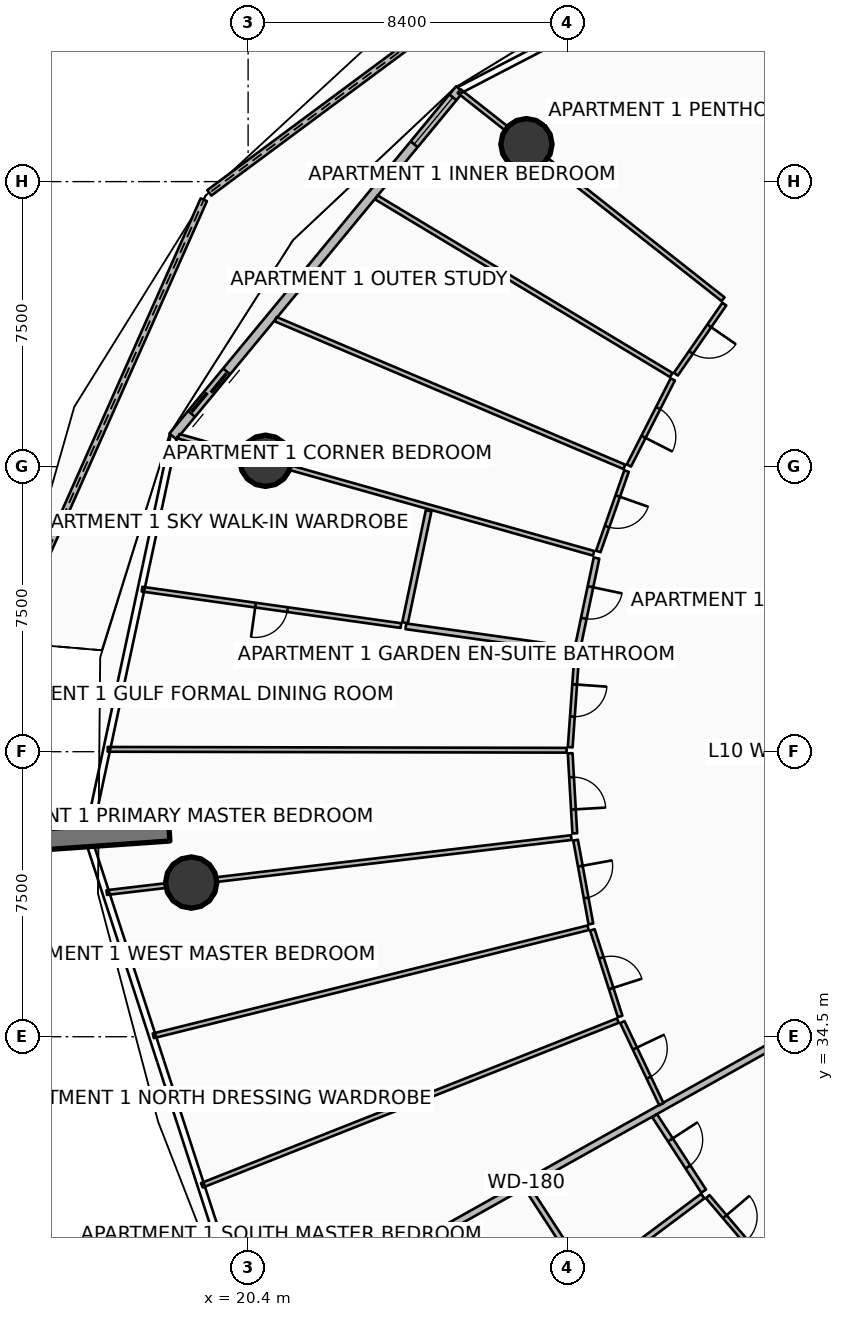
"""IFC4 building model, lengths in metres.
Left out: names, types, materials, properties, quantities, classifications, styles, units other than length and angle.
Written with IfcOpenShell. Run it as: python <this file> out.ifc"""

import sys

from ifc_helpers import new_model, si_unit, direction, frame, frame_2d, origin, origin_2d, place, context, subcontext, project, spatial, polyline, rectangle, circle, outline, extrude, element, fill, save


model = new_model("IFC4")
c1 = context("Model", 3, precision=1e-05, world=origin(), true_north=direction((0.0, 1.0)))
c2 = subcontext(c1, "Body", "Model", "MODEL_VIEW")
j1 = project(units=[si_unit("LENGTHUNIT", "METRE"), si_unit("PLANEANGLEUNIT", "RADIAN")], contexts=[c1])
p1 = place(None, origin())
s1 = spatial("IfcSite", under=j1, at=p1, CompositionType="ELEMENT")
p2 = place(p1, origin())
s2 = spatial("IfcBuilding", under=s1, at=p2, CompositionType="ELEMENT")
p3 = place(p2, frame((0.0, 0.0, 45.15)))
s3 = spatial("IfcBuildingStorey", under=s2, at=p3, CompositionType="ELEMENT", Elevation=45.15)
p4 = place(p3, frame((18.322, 39.925, 0.0), z_axis=(0.0, 0.0, 1.0), x_axis=(-0.997564163539, -0.069754853754, 0.0)))
e1 = element("IfcWall", 1, at=p4, inside=s3, PredefinedType="SOLIDWALL", context=c2, shape_type="SweptSolid", body=[
    extrude(rectangle(XDim=3.5, YDim=0.55, at=frame_2d((1.75, 0.0))), origin(), (0.0, 0.0, 1.0), 3.75),
])
for number, where, z_axis, x_axis in (
    (2, (27.724, 57.984, 0.0), (0.0, 0.0, 1.0), (1.0, 0.0, 0.0)),
    (3, (20.859, 49.655, 0.0), (0.0, 0.0, 1.0), (1.0, 0.0, 0.0)),
    (4, (18.902, 38.556, 0.0), (0.0, 0.0, 1.0), (1.0, 0.0, 0.0)),
):
    element("IfcColumn", number, at=place(p3, frame(where, z_axis=z_axis, x_axis=x_axis)), inside=s3, PredefinedType="COLUMN", context=c2, shape_type="SweptSolid", body=[
        extrude(circle(Radius=0.675, at=origin_2d()), origin(), (0.0, 0.0, 1.0), 3.5),
    ])
p5 = place(p3, frame((29.067, 63.896, 0.0), z_axis=(0.0, 0.0, 1.0), x_axis=(-0.802947764501, -0.596049400204, 0.0)))
e5 = element("IfcWall", 5, at=p5, inside=s3, PredefinedType="PARAPET", context=c2, shape_type="SweptSolid", body=[
    extrude(outline(polyline([(0.0, 0.0), (12.065, 0.0), (12.066, 1.832), (6.033, 1.696), (0.0, 1.497), (0.0, 0.0)])), frame((0.0, 0.09, 0.0), z_axis=(0.0, -1.0, 0.0), x_axis=(1.0, 0.0, 0.0)), (0.0, 0.0, 1.0), 0.18),
])
p6 = place(p3, frame((19.234, 56.523, 0.0), z_axis=(0.0, 0.0, 1.0), x_axis=(-0.405953542593, -0.91389371442, 0.0)))
e6 = element("IfcWall", 6, at=p6, inside=s3, PredefinedType="PARAPET", context=c2, shape_type="SweptSolid", body=[
    extrude(outline(polyline([(0.0, 0.0), (12.74, 0.0), (12.74, 1.756), (6.37, 1.853), (0.0, 1.832), (0.0, 0.0)])), frame((0.0, 0.09, 0.0), z_axis=(0.0, -1.0, 0.0), x_axis=(1.0, 0.0, 0.0)), (0.0, 0.0, 1.0), 0.18),
])
p7 = place(p3, frame((25.967, 59.433, 0.0), z_axis=(0.0, 0.0, 1.0), x_axis=(-0.636674332663, -0.771132799281, 0.0)))
e7 = element("IfcWall", 7, at=p7, inside=s3, PredefinedType="SOLIDWALL", context=c2, shape_type="SweptSolid", body=[
    extrude(rectangle(XDim=11.851, YDim=0.24, at=frame_2d((5.926, 0.0))), origin(), (0.0, 0.0, 1.0), 2.45),
])
p8 = place(p7, frame((9.631, 0.0, 0.0)))
e8 = element("IfcOpeningElement", 8, at=p8, cuts=e7, PredefinedType="OPENING", context=c2, shape_type="SweptSolid", body=[
    extrude(rectangle(XDim=1.45, YDim=2.15, at=frame_2d((0.725, 1.075))), frame((0.0, 0.13, 0.0), z_axis=(0.0, -1.0, 0.0), x_axis=(1.0, 0.0, 0.0)), (0.0, 0.0, 1.0), 0.26),
])
p9 = place(p7, frame((0.28, 0.0, 0.65)))
e9 = element("IfcOpeningElement", 9, at=p9, cuts=e7, PredefinedType="OPENING", context=c2, shape_type="SweptSolid", body=[
    extrude(rectangle(XDim=1.6, YDim=1.5, at=frame_2d((0.8, 0.75))), frame((0.0, 0.13, 0.0), z_axis=(0.0, -1.0, 0.0), x_axis=(1.0, 0.0, 0.0)), (0.0, 0.0, 1.0), 0.26),
])
p10 = place(p3, frame((34.954, 34.694, 0.0), z_axis=(0.0, 0.0, 1.0), x_axis=(-0.872493465611, -0.488625779577, 0.0)))
e10 = element("IfcWall", 10, at=p10, inside=s3, PredefinedType="PARTITIONING", context=c2, shape_type="SweptSolid", body=[
    extrude(rectangle(XDim=16.586, YDim=0.18, at=frame_2d((8.293, 0.0))), origin(), (0.0, 0.0, 1.0), 2.867),
])
p11 = place(p3, frame((32.898, 53.905, 0.0), z_axis=(0.0, 0.0, 1.0), x_axis=(-0.78532854108, 0.619079221558, 0.0)))
e11 = element("IfcWall", 11, at=p11, inside=s3, PredefinedType="PARTITIONING", context=c2, shape_type="SweptSolid", body=[
    extrude(rectangle(XDim=8.842, YDim=0.125, at=frame_2d((4.421, 0.0))), origin(), (0.0, 0.0, 1.0), 2.867),
])
p12 = place(p3, frame((31.534, 51.913, 0.0), z_axis=(0.0, 0.0, 1.0), x_axis=(-0.856706990958, 0.515803384676, 0.0)))
e12 = element("IfcWall", 12, at=p12, inside=s3, PredefinedType="PARTITIONING", context=c2, shape_type="SweptSolid", body=[
    extrude(rectangle(XDim=9.057, YDim=0.125, at=frame_2d((4.528, 0.0))), origin(), (0.0, 0.0, 1.0), 2.94),
])
p13 = place(p3, frame((30.301, 49.494, 0.0), z_axis=(0.0, 0.0, 1.0), x_axis=(-0.920840746031, 0.389938867579, 0.0)))
e13 = element("IfcWall", 13, at=p13, inside=s3, PredefinedType="PARTITIONING", context=c2, shape_type="SweptSolid", body=[
    extrude(rectangle(XDim=9.966, YDim=0.125, at=frame_2d((4.983, 0.0))), origin(), (0.0, 0.0, 1.0), 2.94),
])
p14 = place(p3, frame((32.931, 53.778, 0.0), z_axis=(0.0, 0.0, 1.0), x_axis=(-0.568541738061, -0.822654418382, 0.0)))
e14 = element("IfcWall", 14, at=p14, inside=s3, PredefinedType="PARTITIONING", context=c2, shape_type="SweptSolid", body=[
    extrude(rectangle(XDim=2.242, YDim=0.125, at=frame_2d((1.121, 0.0))), origin(), (0.0, 0.0, 1.0), 2.867),
])
p15 = place(p14, frame((0.696, 0.0, 0.0)))
e15 = element("IfcOpeningElement", 15, at=p15, cuts=e14, PredefinedType="OPENING", context=c2, shape_type="SweptSolid", body=[
    extrude(rectangle(XDim=0.85, YDim=2.06, at=frame_2d((0.425, 1.03))), frame((0.0, 0.073, 0.0), z_axis=(0.0, -1.0, 0.0), x_axis=(1.0, 0.0, 0.0)), (0.0, 0.0, 1.0), 0.145),
])
p16 = place(p3, frame((31.575, 51.796, 0.0), z_axis=(0.0, 0.0, 1.0), x_axis=(-0.454037986735, -0.890982326762, 0.0)))
e16 = element("IfcWall", 16, at=p16, inside=s3, PredefinedType="PARTITIONING", context=c2, shape_type="SweptSolid", body=[
    extrude(rectangle(XDim=2.542, YDim=0.125, at=frame_2d((1.271, 0.0))), origin(), (0.0, 0.0, 1.0), 2.94),
])
p17 = place(p16, frame((0.846, 0.0, 0.0)))
e17 = element("IfcOpeningElement", 17, at=p17, cuts=e16, PredefinedType="OPENING", context=c2, shape_type="SweptSolid", body=[
    extrude(rectangle(XDim=0.85, YDim=2.06, at=frame_2d((0.425, 1.03))), frame((0.0, 0.073, 0.0), z_axis=(0.0, -1.0, 0.0), x_axis=(1.0, 0.0, 0.0)), (0.0, 0.0, 1.0), 0.145),
])
p18 = place(p3, frame((30.358, 49.384, 0.0), z_axis=(0.0, 0.0, 1.0), x_axis=(-0.331344536708, -0.943509829304, 0.0)))
e18 = element("IfcWall", 18, at=p18, inside=s3, PredefinedType="PARTITIONING", context=c2, shape_type="SweptSolid", body=[
    extrude(rectangle(XDim=2.242, YDim=0.125, at=frame_2d((1.121, 0.0))), origin(), (0.0, 0.0, 1.0), 2.867),
])
p19 = place(p18, frame((0.696, 0.0, 0.0)))
e19 = element("IfcOpeningElement", 19, at=p19, cuts=e18, PredefinedType="OPENING", context=c2, shape_type="SweptSolid", body=[
    extrude(rectangle(XDim=0.85, YDim=2.06, at=frame_2d((0.425, 1.03))), frame((0.0, 0.073, 0.0), z_axis=(0.0, -1.0, 0.0), x_axis=(1.0, 0.0, 0.0)), (0.0, 0.0, 1.0), 0.145),
])
p20 = place(p3, frame((29.492, 47.22, 0.0), z_axis=(0.0, 0.0, 1.0), x_axis=(-0.962454721813, 0.271442274635, 0.0)))
e20 = element("IfcWall", 20, at=p20, inside=s3, PredefinedType="PARTITIONING", context=c2, shape_type="SweptSolid", body=[
    extrude(rectangle(XDim=11.344, YDim=0.125, at=frame_2d((5.672, 0.0))), origin(), (0.0, 0.0, 1.0), 2.867),
])
p21 = place(p3, frame((29.568, 47.095, 0.0), z_axis=(0.0, 0.0, 1.0), x_axis=(-0.205861309483, -0.978581177654, 0.0)))
e21 = element("IfcWall", 21, at=p21, inside=s3, PredefinedType="PARTITIONING", context=c2, shape_type="SweptSolid", body=[
    extrude(rectangle(XDim=2.392, YDim=0.15, at=frame_2d((1.196, 0.0))), origin(), (0.0, 0.0, 1.0), 2.867),
])
p22 = place(p21, frame((0.771, 0.0, 0.0)))
e22 = element("IfcOpeningElement", 22, at=p22, cuts=e21, PredefinedType="OPENING", context=c2, shape_type="SweptSolid", body=[
    extrude(rectangle(XDim=0.85, YDim=2.06, at=frame_2d((0.425, 1.03))), frame((0.0, 0.085, 0.0), z_axis=(0.0, -1.0, 0.0), x_axis=(1.0, 0.0, 0.0)), (0.0, 0.0, 1.0), 0.17),
])
p23 = place(p3, frame((25.15, 48.341, 0.0), z_axis=(0.0, 0.0, 1.0), x_axis=(-0.205879759174, -0.978577296264, 0.0)))
e23 = element("IfcWall", 23, at=p23, inside=s3, PredefinedType="PARTITIONING", context=c2, shape_type="SweptSolid", body=[
    extrude(rectangle(XDim=3.012, YDim=0.15, at=frame_2d((1.506, 0.0))), origin(), (0.0, 0.0, 1.0), 2.867),
])
p24 = place(p3, frame((28.968, 44.678, 0.0), z_axis=(0.0, 0.0, 1.0), x_axis=(-0.990240767804, 0.139367219172, 0.0)))
e24 = element("IfcWall", 24, at=p24, inside=s3, PredefinedType="PARTITIONING", context=c2, shape_type="SweptSolid", body=[
    extrude(rectangle(XDim=4.46, YDim=0.15, at=frame_2d((2.23, 0.0))), origin(), (0.0, 0.0, 1.0), 2.94),
])
p25 = place(p3, frame((24.422, 45.318, 0.0), z_axis=(0.0, 0.0, 1.0), x_axis=(-0.990243959665, 0.139344538274, 0.0)))
e25 = element("IfcWall", 25, at=p25, inside=s3, PredefinedType="PARTITIONING", context=c2, shape_type="SweptSolid", body=[
    extrude(rectangle(XDim=6.88, YDim=0.125, at=frame_2d((3.44, 0.0))), origin(), (0.0, 0.0, 1.0), 2.94),
])
p26 = place(p25, frame((3.015, 0.0, 0.0)))
e26 = element("IfcOpeningElement", 26, at=p26, cuts=e25, PredefinedType="OPENING", context=c2, shape_type="SweptSolid", body=[
    extrude(rectangle(XDim=0.85, YDim=2.06, at=frame_2d((0.425, 1.03))), frame((0.0, 0.073, 0.0), z_axis=(0.0, -1.0, 0.0), x_axis=(1.0, 0.0, 0.0)), (0.0, 0.0, 1.0), 0.145),
])
p27 = place(p3, frame((28.78, 42.038, 0.0), z_axis=(0.0, 0.0, 1.0), x_axis=(-0.999998036955, 0.001981435282, 0.0)))
e27 = element("IfcWall", 27, at=p27, inside=s3, PredefinedType="PARTITIONING", context=c2, shape_type="SweptSolid", body=[
    extrude(rectangle(XDim=12.075, YDim=0.125, at=frame_2d((6.038, 0.0))), origin(), (0.0, 0.0, 1.0), 2.94),
])
p28 = place(p3, frame((29.05, 44.576, 0.0), z_axis=(0.0, 0.0, 1.0), x_axis=(-0.070831673661, -0.997488282641, 0.0)))
e28 = element("IfcWall", 28, at=p28, inside=s3, PredefinedType="PARTITIONING", context=c2, shape_type="SweptSolid", body=[
    extrude(rectangle(XDim=2.464, YDim=0.125, at=frame_2d((1.232, 0.0))), origin(), (0.0, 0.0, 1.0), 2.94),
])
p29 = place(p28, frame((0.807, 0.0, 0.0)))
e29 = element("IfcOpeningElement", 29, at=p29, cuts=e28, PredefinedType="OPENING", context=c2, shape_type="SweptSolid", body=[
    extrude(rectangle(XDim=0.85, YDim=2.06, at=frame_2d((0.425, 1.03))), frame((0.0, 0.073, 0.0), z_axis=(0.0, -1.0, 0.0), x_axis=(1.0, 0.0, 0.0)), (0.0, 0.0, 1.0), 0.145),
])
p30 = place(p3, frame((28.875, 41.958, 0.0), z_axis=(0.0, 0.0, 1.0), x_axis=(0.057962417622, -0.998318765797, 0.0)))
e30 = element("IfcWall", 30, at=p30, inside=s3, PredefinedType="PARTITIONING", context=c2, shape_type="SweptSolid", body=[
    extrude(rectangle(XDim=2.11, YDim=0.125, at=frame_2d((1.055, 0.0))), origin(), (0.0, 0.0, 1.0), 2.867),
])
p31 = place(p30, frame((0.63, 0.0, 0.0)))
e31 = element("IfcOpeningElement", 31, at=p31, cuts=e30, PredefinedType="OPENING", context=c2, shape_type="SweptSolid", body=[
    extrude(rectangle(XDim=0.85, YDim=2.06, at=frame_2d((0.425, 1.03))), frame((0.0, 0.073, 0.0), z_axis=(0.0, -1.0, 0.0), x_axis=(1.0, 0.0, 0.0)), (0.0, 0.0, 1.0), 0.145),
])
p32 = place(p3, frame((28.903, 39.74, 0.0), z_axis=(0.0, 0.0, 1.0), x_axis=(-0.993068040113, -0.117540919282, 0.0)))
e32 = element("IfcWall", 32, at=p32, inside=s3, PredefinedType="PARTITIONING", context=c2, shape_type="SweptSolid", body=[
    extrude(rectangle(XDim=12.309, YDim=0.125, at=frame_2d((6.154, 0.0))), origin(), (0.0, 0.0, 1.0), 2.867),
])
p33 = place(p3, frame((29.347, 37.366, 0.0), z_axis=(0.0, 0.0, 1.0), x_axis=(-0.970510462135, -0.241059002917, 0.0)))
e33 = element("IfcWall", 33, at=p33, inside=s3, PredefinedType="PARTITIONING", context=c2, shape_type="SweptSolid", body=[
    extrude(rectangle(XDim=11.79, YDim=0.125, at=frame_2d((5.895, 0.0))), origin(), (0.0, 0.0, 1.0), 2.94),
])
p34 = place(p3, frame((30.13, 34.925, 0.0), z_axis=(0.0, 0.0, 1.0), x_axis=(-0.929770978957, -0.368138461302, 0.0)))
e34 = element("IfcWall", 34, at=p34, inside=s3, PredefinedType="PARTITIONING", context=c2, shape_type="SweptSolid", body=[
    extrude(rectangle(XDim=11.773, YDim=0.125, at=frame_2d((5.887, 0.0))), origin(), (0.0, 0.0, 1.0), 2.94),
])
p35 = place(p3, frame((29.017, 39.673, 0.0), z_axis=(0.0, 0.0, 1.0), x_axis=(0.179632658462, -0.983733758704, 0.0)))
e35 = element("IfcWall", 35, at=p35, inside=s3, PredefinedType="PARTITIONING", context=c2, shape_type="SweptSolid", body=[
    extrude(rectangle(XDim=2.242, YDim=0.125, at=frame_2d((1.121, 0.0))), origin(), (0.0, 0.0, 1.0), 2.867),
])
p36 = place(p35, frame((0.696, 0.0, 0.0)))
e36 = element("IfcOpeningElement", 36, at=p36, cuts=e35, PredefinedType="OPENING", context=c2, shape_type="SweptSolid", body=[
    extrude(rectangle(XDim=0.85, YDim=2.06, at=frame_2d((0.425, 1.03))), frame((0.0, 0.073, 0.0), z_axis=(0.0, -1.0, 0.0), x_axis=(1.0, 0.0, 0.0)), (0.0, 0.0, 1.0), 0.145),
])
p37 = place(p3, frame((29.458, 37.312, 0.0), z_axis=(0.0, 0.0, 1.0), x_axis=(0.305338513131, -0.952243872335, 0.0)))
e37 = element("IfcWall", 37, at=p37, inside=s3, PredefinedType="PARTITIONING", context=c2, shape_type="SweptSolid", body=[
    extrude(rectangle(XDim=2.392, YDim=0.125, at=frame_2d((1.196, 0.0))), origin(), (0.0, 0.0, 1.0), 2.94),
])
p38 = place(p37, frame((0.771, 0.0, 0.0)))
e38 = element("IfcOpeningElement", 38, at=p38, cuts=e37, PredefinedType="OPENING", context=c2, shape_type="SweptSolid", body=[
    extrude(rectangle(XDim=0.85, YDim=2.06, at=frame_2d((0.425, 1.03))), frame((0.0, 0.073, 0.0), z_axis=(0.0, -1.0, 0.0), x_axis=(1.0, 0.0, 0.0)), (0.0, 0.0, 1.0), 0.145),
])
p39 = place(p3, frame((30.248, 34.885, 0.0), z_axis=(0.0, 0.0, 1.0), x_axis=(0.429366977128, -0.903130111862, 0.0)))
e39 = element("IfcWall", 39, at=p39, inside=s3, PredefinedType="PARTITIONING", context=c2, shape_type="SweptSolid", body=[
    extrude(rectangle(XDim=2.392, YDim=0.125, at=frame_2d((1.196, 0.0))), origin(), (0.0, 0.0, 1.0), 2.867),
])
p40 = place(p39, frame((0.771, 0.0, 0.0)))
e40 = element("IfcOpeningElement", 40, at=p40, cuts=e39, PredefinedType="OPENING", context=c2, shape_type="SweptSolid", body=[
    extrude(rectangle(XDim=0.85, YDim=2.06, at=frame_2d((0.425, 1.03))), frame((0.0, 0.073, 0.0), z_axis=(0.0, -1.0, 0.0), x_axis=(1.0, 0.0, 0.0)), (0.0, 0.0, 1.0), 0.145),
])
p41 = place(p3, frame((31.098, 32.42, 0.0), z_axis=(0.0, 0.0, 1.0), x_axis=(0.544893998924, -0.838504937336, 0.0)))
e41 = element("IfcWall", 41, at=p41, inside=s3, PredefinedType="PARTITIONING", context=c2, shape_type="SweptSolid", body=[
    extrude(rectangle(XDim=2.365, YDim=0.15, at=frame_2d((1.182, 0.0))), origin(), (0.0, 0.0, 1.0), 2.867),
])
p42 = place(p41, frame((0.757, 0.0, 0.0)))
e42 = element("IfcOpeningElement", 42, at=p42, cuts=e41, PredefinedType="OPENING", context=c2, shape_type="SweptSolid", body=[
    extrude(rectangle(XDim=0.85, YDim=2.06, at=frame_2d((0.425, 1.03))), frame((0.0, 0.085, 0.0), z_axis=(0.0, -1.0, 0.0), x_axis=(1.0, 0.0, 0.0)), (0.0, 0.0, 1.0), 0.17),
])
p43 = place(p3, frame((27.739, 30.539, 0.0), z_axis=(0.0, 0.0, 1.0), x_axis=(0.544928567987, -0.838482471965, 0.0)))
e43 = element("IfcWall", 43, at=p43, inside=s3, PredefinedType="PARTITIONING", context=c2, shape_type="SweptSolid", body=[
    extrude(rectangle(XDim=2.871, YDim=0.15, at=frame_2d((1.436, 0.0))), origin(), (0.0, 0.0, 1.0), 2.867),
])
p44 = place(p3, frame((32.364, 30.308, 0.0), z_axis=(0.0, 0.0, 1.0), x_axis=(-0.800857594538, -0.59885483489, 0.0)))
e44 = element("IfcWall", 44, at=p44, inside=s3, PredefinedType="PARTITIONING", context=c2, shape_type="SweptSolid", body=[
    extrude(rectangle(XDim=3.72, YDim=0.15, at=frame_2d((1.86, 0.0))), origin(), (0.0, 0.0, 1.0), 2.94),
])
p45 = place(p3, frame((32.494, 30.293, 0.0), z_axis=(0.0, 0.0, 1.0), x_axis=(0.64730971506, -0.762227087415, 0.0)))
e45 = element("IfcWall", 45, at=p45, inside=s3, PredefinedType="PARTITIONING", context=c2, shape_type="SweptSolid", body=[
    extrude(rectangle(XDim=2.239, YDim=0.125, at=frame_2d((1.12, 0.0))), origin(), (0.0, 0.0, 1.0), 2.94),
])
p46 = place(p45, frame((0.695, 0.0, 0.0)))
e46 = element("IfcOpeningElement", 46, at=p46, cuts=e45, PredefinedType="OPENING", context=c2, shape_type="SweptSolid", body=[
    extrude(rectangle(XDim=0.85, YDim=2.06, at=frame_2d((0.425, 1.03))), frame((0.0, 0.073, 0.0), z_axis=(0.0, -1.0, 0.0), x_axis=(1.0, 0.0, 0.0)), (0.0, 0.0, 1.0), 0.145),
])
p47 = place(p8, origin())
e47 = element("IfcDoor", 47, at=p47, inside=s3, OperationType="DOUBLE_DOOR_SLIDING", PredefinedType="DOOR", context=c2, shape_type="SweptSolid", body=[
    extrude(rectangle(XDim=1.45, YDim=2.15, at=frame_2d((0.725, 1.075))), frame((0.0, 0.025, 0.0), z_axis=(0.0, -1.0, 0.0), x_axis=(1.0, 0.0, 0.0)), (0.0, 0.0, 1.0), 0.05),
])
fill(e8, e47)
p48 = place(p9, origin())
e48 = element("IfcWindow", 48, at=p48, inside=s3, PartitioningType="SINGLE_PANEL", PredefinedType="WINDOW", context=c2, shape_type="SweptSolid", body=[
    extrude(rectangle(XDim=1.6, YDim=1.5, at=frame_2d((0.8, 0.75))), frame((0.0, 0.03, 0.0), z_axis=(0.0, -1.0, 0.0), x_axis=(1.0, 0.0, 0.0)), (0.0, 0.0, 1.0), 0.06),
])
fill(e9, e48)
p49 = place(p15, origin())
e49 = element("IfcDoor", 49, at=p49, inside=s3, OperationType="SINGLE_SWING_LEFT", PredefinedType="DOOR", context=c2, shape_type="SweptSolid", body=[
    extrude(rectangle(XDim=0.85, YDim=2.06, at=frame_2d((0.425, 1.03))), frame((0.0, 0.025, 0.0), z_axis=(0.0, -1.0, 0.0), x_axis=(1.0, 0.0, 0.0)), (0.0, 0.0, 1.0), 0.05),
])
fill(e15, e49)
p50 = place(p17, origin())
e50 = element("IfcDoor", 50, at=p50, inside=s3, OperationType="SINGLE_SWING_RIGHT", PredefinedType="DOOR", context=c2, shape_type="SweptSolid", body=[
    extrude(rectangle(XDim=0.85, YDim=2.06, at=frame_2d((0.425, 1.03))), frame((0.0, 0.025, 0.0), z_axis=(0.0, -1.0, 0.0), x_axis=(1.0, 0.0, 0.0)), (0.0, 0.0, 1.0), 0.05),
])
fill(e17, e50)
p51 = place(p19, origin())
e51 = element("IfcDoor", 51, at=p51, inside=s3, OperationType="SINGLE_SWING_LEFT", PredefinedType="DOOR", context=c2, shape_type="SweptSolid", body=[
    extrude(rectangle(XDim=0.85, YDim=2.06, at=frame_2d((0.425, 1.03))), frame((0.0, 0.025, 0.0), z_axis=(0.0, -1.0, 0.0), x_axis=(1.0, 0.0, 0.0)), (0.0, 0.0, 1.0), 0.05),
])
fill(e19, e51)
p52 = place(p22, origin())
e52 = element("IfcDoor", 52, at=p52, inside=s3, OperationType="SINGLE_SWING_LEFT", PredefinedType="DOOR", context=c2, shape_type="SweptSolid", body=[
    extrude(rectangle(XDim=0.85, YDim=2.06, at=frame_2d((0.425, 1.03))), frame((0.0, 0.025, 0.0), z_axis=(0.0, -1.0, 0.0), x_axis=(1.0, 0.0, 0.0)), (0.0, 0.0, 1.0), 0.05),
])
fill(e22, e52)
p53 = place(p26, origin())
e53 = element("IfcDoor", 53, at=p53, inside=s3, OperationType="SINGLE_SWING_RIGHT", PredefinedType="DOOR", context=c2, shape_type="SweptSolid", body=[
    extrude(rectangle(XDim=0.85, YDim=2.06, at=frame_2d((0.425, 1.03))), frame((0.0, 0.025, 0.0), z_axis=(0.0, -1.0, 0.0), x_axis=(1.0, 0.0, 0.0)), (0.0, 0.0, 1.0), 0.05),
])
fill(e26, e53)
p54 = place(p29, origin())
e54 = element("IfcDoor", 54, at=p54, inside=s3, OperationType="SINGLE_SWING_LEFT", PredefinedType="DOOR", context=c2, shape_type="SweptSolid", body=[
    extrude(rectangle(XDim=0.85, YDim=2.06, at=frame_2d((0.425, 1.03))), frame((0.0, 0.025, 0.0), z_axis=(0.0, -1.0, 0.0), x_axis=(1.0, 0.0, 0.0)), (0.0, 0.0, 1.0), 0.05),
])
fill(e29, e54)
p55 = place(p31, origin())
e55 = element("IfcDoor", 55, at=p55, inside=s3, OperationType="SINGLE_SWING_RIGHT", PredefinedType="DOOR", context=c2, shape_type="SweptSolid", body=[
    extrude(rectangle(XDim=0.85, YDim=2.06, at=frame_2d((0.425, 1.03))), frame((0.0, 0.025, 0.0), z_axis=(0.0, -1.0, 0.0), x_axis=(1.0, 0.0, 0.0)), (0.0, 0.0, 1.0), 0.05),
])
fill(e31, e55)
p56 = place(p36, origin())
e56 = element("IfcDoor", 56, at=p56, inside=s3, OperationType="SINGLE_SWING_LEFT", PredefinedType="DOOR", context=c2, shape_type="SweptSolid", body=[
    extrude(rectangle(XDim=0.85, YDim=2.06, at=frame_2d((0.425, 1.03))), frame((0.0, 0.025, 0.0), z_axis=(0.0, -1.0, 0.0), x_axis=(1.0, 0.0, 0.0)), (0.0, 0.0, 1.0), 0.05),
])
fill(e36, e56)
p57 = place(p38, origin())
e57 = element("IfcDoor", 57, at=p57, inside=s3, OperationType="SINGLE_SWING_RIGHT", PredefinedType="DOOR", context=c2, shape_type="SweptSolid", body=[
    extrude(rectangle(XDim=0.85, YDim=2.06, at=frame_2d((0.425, 1.03))), frame((0.0, 0.025, 0.0), z_axis=(0.0, -1.0, 0.0), x_axis=(1.0, 0.0, 0.0)), (0.0, 0.0, 1.0), 0.05),
])
fill(e38, e57)
p58 = place(p40, origin())
e58 = element("IfcDoor", 58, at=p58, inside=s3, OperationType="SINGLE_SWING_LEFT", PredefinedType="DOOR", context=c2, shape_type="SweptSolid", body=[
    extrude(rectangle(XDim=0.85, YDim=2.06, at=frame_2d((0.425, 1.03))), frame((0.0, 0.025, 0.0), z_axis=(0.0, -1.0, 0.0), x_axis=(1.0, 0.0, 0.0)), (0.0, 0.0, 1.0), 0.05),
])
fill(e40, e58)
p59 = place(p42, origin())
e59 = element("IfcDoor", 59, at=p59, inside=s3, OperationType="SINGLE_SWING_LEFT", PredefinedType="DOOR", context=c2, shape_type="SweptSolid", body=[
    extrude(rectangle(XDim=0.85, YDim=2.06, at=frame_2d((0.425, 1.03))), frame((0.0, 0.025, 0.0), z_axis=(0.0, -1.0, 0.0), x_axis=(1.0, 0.0, 0.0)), (0.0, 0.0, 1.0), 0.05),
])
fill(e42, e59)
p60 = place(p46, origin())
e60 = element("IfcDoor", 60, at=p60, inside=s3, OperationType="SINGLE_SWING_LEFT", PredefinedType="DOOR", context=c2, shape_type="SweptSolid", body=[
    extrude(rectangle(XDim=0.85, YDim=2.06, at=frame_2d((0.425, 1.03))), frame((0.0, 0.025, 0.0), z_axis=(0.0, -1.0, 0.0), x_axis=(1.0, 0.0, 0.0)), (0.0, 0.0, 1.0), 0.05),
])
fill(e46, e60)
save(model, sys.argv[1])
